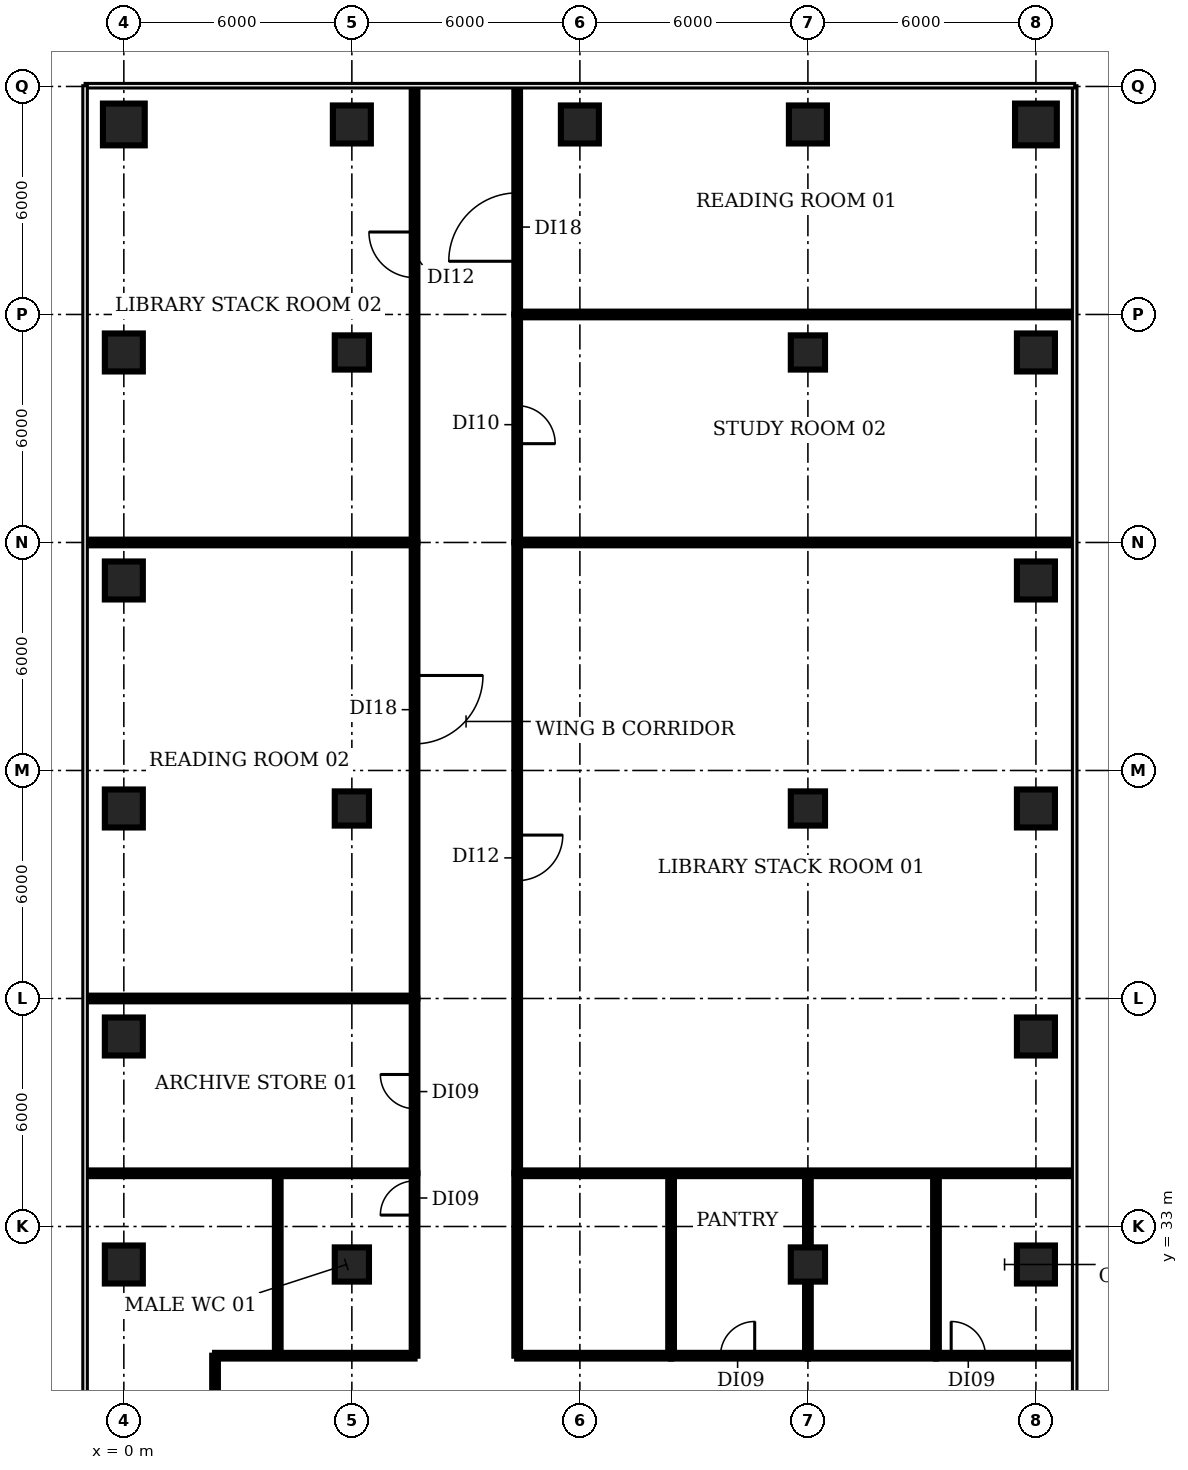
"""IFC4 building model, lengths in metres.
Left out: names, types, materials, properties, quantities, classifications, styles, units other than length and angle.
Written with IfcOpenShell. Run it as: python <this file> out.ifc"""

import sys

from ifc_helpers import new_model, si_unit, direction, frame, frame_2d, origin, origin_2d, place, context, subcontext, project, spatial, rectangle, circle, extrude, element, fill, save


model = new_model("IFC4")
c1 = context("Model", 3, precision=1e-05, world=origin(), true_north=direction((0.0, 1.0)))
c2 = subcontext(c1, "Body", "Model", "MODEL_VIEW")
j1 = project(units=[si_unit("LENGTHUNIT", "METRE"), si_unit("PLANEANGLEUNIT", "RADIAN")], contexts=[c1])
p1 = place(None, origin())
s1 = spatial("IfcSite", under=j1, at=p1, CompositionType="ELEMENT")
p2 = place(p1, origin())
s2 = spatial("IfcBuilding", under=s1, at=p2, CompositionType="ELEMENT")
p3 = place(p2, frame((0.0, 0.0, 15.5)))
s3 = spatial("IfcBuildingStorey", under=s2, at=p3, CompositionType="ELEMENT", Elevation=15.5)
for number, where, z_axis, x_axis in (
    (1, (0.0, 32.0, 0.0), (0.0, 0.0, 1.0), (1.0, 0.0, 0.0)),
    (2, (0.0, 38.0, 0.0), (0.0, 0.0, 1.0), (1.0, 0.0, 0.0)),
    (3, (0.0, 44.0, 0.0), (0.0, 0.0, 1.0), (1.0, 0.0, 0.0)),
    (4, (0.0, 50.0, 0.0), (0.0, 0.0, 1.0), (1.0, 0.0, 0.0)),
    (5, (0.0, 56.0, 0.0), (0.0, 0.0, 1.0), (1.0, 0.0, 0.0)),
):
    element("IfcColumn", number, at=place(p3, frame(where, z_axis=z_axis, x_axis=x_axis)), inside=s3, PredefinedType="COLUMN", context=c2, shape_type="SweptSolid", body=[
        extrude(rectangle(XDim=1.0, YDim=1.0, at=origin_2d()), origin(), (0.0, 0.0, 1.0), 4.15),
    ])
p4 = place(p3, frame((0.0, 62.0, 0.0), z_axis=(0.0, 0.0, 1.0), x_axis=(1.0, 0.0, 0.0)))
e6 = element("IfcColumn", 6, at=p4, inside=s3, PredefinedType="COLUMN", context=c2, shape_type="SweptSolid", body=[
    extrude(circle(Radius=0.55, at=origin_2d()), origin(), (0.0, 0.0, 1.0), 4.15),
])
for number, where, z_axis, x_axis in (
    (7, (6.0, 32.0, 0.0), (0.0, 0.0, 1.0), (1.0, 0.0, 0.0)),
    (8, (6.0, 44.0, 0.0), (0.0, 0.0, 1.0), (1.0, 0.0, 0.0)),
    (9, (6.0, 56.0, 0.0), (0.0, 0.0, 1.0), (1.0, 0.0, 0.0)),
):
    element("IfcColumn", number, at=place(p3, frame(where, z_axis=z_axis, x_axis=x_axis)), inside=s3, PredefinedType="COLUMN", context=c2, shape_type="SweptSolid", body=[
        extrude(rectangle(XDim=0.9, YDim=0.9, at=origin_2d()), origin(), (0.0, 0.0, 1.0), 4.15),
    ])
for number, where, z_axis, x_axis in (
    (10, (6.0, 62.0, 0.0), (0.0, 0.0, 1.0), (1.0, 0.0, 0.0)),
    (11, (12.0, 62.0, 0.0), (0.0, 0.0, 1.0), (1.0, 0.0, 0.0)),
):
    element("IfcColumn", number, at=place(p3, frame(where, z_axis=z_axis, x_axis=x_axis)), inside=s3, PredefinedType="COLUMN", context=c2, shape_type="SweptSolid", body=[
        extrude(rectangle(XDim=1.0, YDim=1.0, at=origin_2d()), origin(), (0.0, 0.0, 1.0), 4.15),
    ])
for number, where, z_axis, x_axis in (
    (12, (18.0, 32.0, 0.0), (0.0, 0.0, 1.0), (1.0, 0.0, 0.0)),
    (13, (18.0, 44.0, 0.0), (0.0, 0.0, 1.0), (1.0, 0.0, 0.0)),
    (14, (18.0, 56.0, 0.0), (0.0, 0.0, 1.0), (1.0, 0.0, 0.0)),
):
    element("IfcColumn", number, at=place(p3, frame(where, z_axis=z_axis, x_axis=x_axis)), inside=s3, PredefinedType="COLUMN", context=c2, shape_type="SweptSolid", body=[
        extrude(rectangle(XDim=0.9, YDim=0.9, at=origin_2d()), origin(), (0.0, 0.0, 1.0), 4.15),
    ])
for number, where, z_axis, x_axis in (
    (15, (18.0, 62.0, 0.0), (0.0, 0.0, 1.0), (1.0, 0.0, 0.0)),
    (16, (24.0, 32.0, 0.0), (0.0, 0.0, 1.0), (1.0, 0.0, 0.0)),
    (17, (24.0, 38.0, 0.0), (0.0, 0.0, 1.0), (1.0, 0.0, 0.0)),
    (18, (24.0, 44.0, 0.0), (0.0, 0.0, 1.0), (1.0, 0.0, 0.0)),
    (19, (24.0, 50.0, 0.0), (0.0, 0.0, 1.0), (1.0, 0.0, 0.0)),
    (20, (24.0, 56.0, 0.0), (0.0, 0.0, 1.0), (1.0, 0.0, 0.0)),
):
    element("IfcColumn", number, at=place(p3, frame(where, z_axis=z_axis, x_axis=x_axis)), inside=s3, PredefinedType="COLUMN", context=c2, shape_type="SweptSolid", body=[
        extrude(rectangle(XDim=1.0, YDim=1.0, at=origin_2d()), origin(), (0.0, 0.0, 1.0), 4.15),
    ])
p5 = place(p3, frame((24.0, 62.0, 0.0), z_axis=(0.0, 0.0, 1.0), x_axis=(1.0, 0.0, 0.0)))
e21 = element("IfcColumn", 21, at=p5, inside=s3, PredefinedType="COLUMN", context=c2, shape_type="SweptSolid", body=[
    extrude(circle(Radius=0.55, at=origin_2d()), origin(), (0.0, 0.0, 1.0), 4.15),
])
for number, where, z_axis, x_axis in (
    (22, (-0.97, 34.4, 0.0), (0.0, 0.0, 1.0), (1.0, 0.0, 0.0)),
    (23, (-0.97, 39.0, 0.0), (0.0, 0.0, 1.0), (1.0, 0.0, 0.0)),
    (24, (-0.97, 51.0, 0.0), (0.0, 0.0, 1.0), (1.0, 0.0, 0.0)),
):
    element("IfcWall", number, at=place(p3, frame(where, z_axis=z_axis, x_axis=x_axis)), inside=s3, PredefinedType="PARTITIONING", context=c2, shape_type="SweptSolid", body=[
        extrude(rectangle(XDim=8.62, YDim=0.15, at=frame_2d((4.31, 0.0))), origin(), (0.0, 0.0, 1.0), 3.08),
    ])
p6 = place(p3, frame((2.4, 25.7, 0.0), z_axis=(0.0, 0.0, 1.0), x_axis=(0.0, 1.0, 0.0)))
e25 = element("IfcWall", 25, at=p6, inside=s3, PredefinedType="PARTITIONING", context=c2, shape_type="SweptSolid", body=[
    extrude(rectangle(XDim=3.9, YDim=0.15, at=frame_2d((1.95, 0.0))), origin(), (0.0, 0.0, 1.0), 3.08),
])
p7 = place(p3, frame((2.4, 29.6, 0.0), z_axis=(0.0, 0.0, 1.0), x_axis=(1.0, 0.0, 0.0)))
e26 = element("IfcWall", 26, at=p7, inside=s3, PredefinedType="PARTITIONING", context=c2, shape_type="SweptSolid", body=[
    extrude(rectangle(XDim=5.25, YDim=0.15, at=frame_2d((2.625, 0.0))), origin(), (0.0, 0.0, 1.0), 3.08),
])
p8 = place(p3, frame((4.05, 29.6, 0.0), z_axis=(0.0, 0.0, 1.0), x_axis=(0.0, 1.0, 0.0)))
e27 = element("IfcWall", 27, at=p8, inside=s3, PredefinedType="PARTITIONING", context=c2, shape_type="SweptSolid", body=[
    extrude(rectangle(XDim=4.8, YDim=0.15, at=frame_2d((2.4, 0.0))), origin(), (0.0, 0.0, 1.0), 3.08),
])
p9 = place(p3, frame((7.65, 29.6, 0.0), z_axis=(0.0, 0.0, 1.0), x_axis=(0.0, 1.0, 0.0)))
e28 = element("IfcWall", 28, at=p9, inside=s3, PredefinedType="PARTITIONING", context=c2, shape_type="SweptSolid", body=[
    extrude(rectangle(XDim=4.8, YDim=0.15, at=frame_2d((2.4, 0.0))), origin(), (0.0, 0.0, 1.0), 3.08),
])
p10 = place(p9, frame((3.7, 0.0, 0.0)))
e29 = element("IfcOpeningElement", 29, at=p10, cuts=e28, PredefinedType="OPENING", context=c2, shape_type="SweptSolid", body=[
    extrude(rectangle(XDim=0.9, YDim=2.1, at=frame_2d((0.45, 1.05))), frame((0.0, 0.085, 0.0), z_axis=(0.0, -1.0, 0.0), x_axis=(1.0, 0.0, 0.0)), (0.0, 0.0, 1.0), 0.17),
])
p11 = place(p3, frame((7.65, 34.4, 0.0), z_axis=(0.0, 0.0, 1.0), x_axis=(0.0, 1.0, 0.0)))
e30 = element("IfcWall", 30, at=p11, inside=s3, PredefinedType="PARTITIONING", context=c2, shape_type="SweptSolid", body=[
    extrude(rectangle(XDim=4.6, YDim=0.15, at=frame_2d((2.3, 0.0))), origin(), (0.0, 0.0, 1.0), 3.08),
])
p12 = place(p11, frame((1.7, 0.0, 0.0)))
e31 = element("IfcOpeningElement", 31, at=p12, cuts=e30, PredefinedType="OPENING", context=c2, shape_type="SweptSolid", body=[
    extrude(rectangle(XDim=0.9, YDim=2.1, at=frame_2d((0.45, 1.05))), frame((0.0, 0.085, 0.0), z_axis=(0.0, -1.0, 0.0), x_axis=(1.0, 0.0, 0.0)), (0.0, 0.0, 1.0), 0.17),
])
p13 = place(p3, frame((7.65, 51.0, 0.0), z_axis=(0.0, 0.0, 1.0), x_axis=(0.0, -1.0, 0.0)))
e32 = element("IfcWall", 32, at=p13, inside=s3, PredefinedType="PARTITIONING", context=c2, shape_type="SweptSolid", body=[
    extrude(rectangle(XDim=12.0, YDim=0.15, at=frame_2d((6.0, 0.0))), origin(), (0.0, 0.0, 1.0), 3.08),
])
p14 = place(p13, frame((3.5, 0.0, 0.0)))
e33 = element("IfcOpeningElement", 33, at=p14, cuts=e32, PredefinedType="OPENING", context=c2, shape_type="SweptSolid", body=[
    extrude(rectangle(XDim=1.8, YDim=2.1, at=frame_2d((0.9, 1.05))), frame((0.0, 0.085, 0.0), z_axis=(0.0, -1.0, 0.0), x_axis=(1.0, 0.0, 0.0)), (0.0, 0.0, 1.0), 0.17),
])
p15 = place(p3, frame((7.65, 51.0, 0.0), z_axis=(0.0, 0.0, 1.0), x_axis=(0.0, 1.0, 0.0)))
e34 = element("IfcWall", 34, at=p15, inside=s3, PredefinedType="PARTITIONING", context=c2, shape_type="SweptSolid", body=[
    extrude(rectangle(XDim=11.97, YDim=0.15, at=frame_2d((5.985, 0.0))), origin(), (0.0, 0.0, 1.0), 3.08),
])
p16 = place(p15, frame((6.97, 0.0, 0.0)))
e35 = element("IfcOpeningElement", 35, at=p16, cuts=e34, PredefinedType="OPENING", context=c2, shape_type="SweptSolid", body=[
    extrude(rectangle(XDim=1.2, YDim=2.1, at=frame_2d((0.6, 1.05))), frame((0.0, 0.085, 0.0), z_axis=(0.0, -1.0, 0.0), x_axis=(1.0, 0.0, 0.0)), (0.0, 0.0, 1.0), 0.17),
])
p17 = place(p3, frame((10.35, 29.6, 0.0), z_axis=(0.0, 0.0, 1.0), x_axis=(0.0, 1.0, 0.0)))
e36 = element("IfcWall", 36, at=p17, inside=s3, PredefinedType="PARTITIONING", context=c2, shape_type="SweptSolid", body=[
    extrude(rectangle(XDim=4.8, YDim=0.15, at=frame_2d((2.4, 0.0))), origin(), (0.0, 0.0, 1.0), 3.08),
])
p18 = place(p3, frame((10.35, 29.6, 0.0), z_axis=(0.0, 0.0, 1.0), x_axis=(1.0, 0.0, 0.0)))
e37 = element("IfcWall", 37, at=p18, inside=s3, PredefinedType="PARTITIONING", context=c2, shape_type="SweptSolid", body=[
    extrude(rectangle(XDim=4.05, YDim=0.15, at=frame_2d((2.025, 0.0))), origin(), (0.0, 0.0, 1.0), 3.08),
])
p19 = place(p3, frame((10.35, 34.4, 0.0), z_axis=(0.0, 0.0, 1.0), x_axis=(1.0, 0.0, 0.0)))
e38 = element("IfcWall", 38, at=p19, inside=s3, PredefinedType="PARTITIONING", context=c2, shape_type="SweptSolid", body=[
    extrude(rectangle(XDim=14.62, YDim=0.15, at=frame_2d((7.31, 0.0))), origin(), (0.0, 0.0, 1.0), 3.08),
])
p20 = place(p3, frame((10.35, 51.0, 0.0), z_axis=(0.0, 0.0, 1.0), x_axis=(0.0, -1.0, 0.0)))
e39 = element("IfcWall", 39, at=p20, inside=s3, PredefinedType="PARTITIONING", context=c2, shape_type="SweptSolid", body=[
    extrude(rectangle(XDim=16.6, YDim=0.15, at=frame_2d((8.3, 0.0))), origin(), (0.0, 0.0, 1.0), 3.08),
])
p21 = place(p20, frame((7.7, 0.0, 0.0)))
e40 = element("IfcOpeningElement", 40, at=p21, cuts=e39, PredefinedType="OPENING", context=c2, shape_type="SweptSolid", body=[
    extrude(rectangle(XDim=1.2, YDim=2.1, at=frame_2d((0.6, 1.05))), frame((0.0, 0.085, 0.0), z_axis=(0.0, -1.0, 0.0), x_axis=(1.0, 0.0, 0.0)), (0.0, 0.0, 1.0), 0.17),
])
p22 = place(p3, frame((10.35, 51.0, 0.0), z_axis=(0.0, 0.0, 1.0), x_axis=(1.0, 0.0, 0.0)))
e41 = element("IfcWall", 41, at=p22, inside=s3, PredefinedType="PARTITIONING", context=c2, shape_type="SweptSolid", body=[
    extrude(rectangle(XDim=14.62, YDim=0.15, at=frame_2d((7.31, 0.0))), origin(), (0.0, 0.0, 1.0), 3.08),
])
p23 = place(p3, frame((10.35, 57.0, 0.0), z_axis=(0.0, 0.0, 1.0), x_axis=(0.0, -1.0, 0.0)))
e42 = element("IfcWall", 42, at=p23, inside=s3, PredefinedType="PARTITIONING", context=c2, shape_type="SweptSolid", body=[
    extrude(rectangle(XDim=6.0, YDim=0.15, at=frame_2d((3.0, 0.0))), origin(), (0.0, 0.0, 1.0), 3.08),
])
p24 = place(p23, frame((2.4, 0.0, 0.0)))
e43 = element("IfcOpeningElement", 43, at=p24, cuts=e42, PredefinedType="OPENING", context=c2, shape_type="SweptSolid", body=[
    extrude(rectangle(XDim=1.0, YDim=2.1, at=frame_2d((0.5, 1.05))), frame((0.0, 0.085, 0.0), z_axis=(0.0, -1.0, 0.0), x_axis=(1.0, 0.0, 0.0)), (0.0, 0.0, 1.0), 0.17),
])
p25 = place(p3, frame((10.35, 57.0, 0.0), z_axis=(0.0, 0.0, 1.0), x_axis=(0.0, 1.0, 0.0)))
e44 = element("IfcWall", 44, at=p25, inside=s3, PredefinedType="PARTITIONING", context=c2, shape_type="SweptSolid", body=[
    extrude(rectangle(XDim=5.97, YDim=0.15, at=frame_2d((2.985, 0.0))), origin(), (0.0, 0.0, 1.0), 3.08),
])
p26 = place(p25, frame((1.4, 0.0, 0.0)))
e45 = element("IfcOpeningElement", 45, at=p26, cuts=e44, PredefinedType="OPENING", context=c2, shape_type="SweptSolid", body=[
    extrude(rectangle(XDim=1.8, YDim=2.1, at=frame_2d((0.9, 1.05))), frame((0.0, 0.085, 0.0), z_axis=(0.0, -1.0, 0.0), x_axis=(1.0, 0.0, 0.0)), (0.0, 0.0, 1.0), 0.17),
])
p27 = place(p3, frame((10.35, 57.0, 0.0), z_axis=(0.0, 0.0, 1.0), x_axis=(1.0, 0.0, 0.0)))
e46 = element("IfcWall", 46, at=p27, inside=s3, PredefinedType="PARTITIONING", context=c2, shape_type="SweptSolid", body=[
    extrude(rectangle(XDim=14.605, YDim=0.15, at=frame_2d((7.302, 0.0))), origin(), (0.0, 0.0, 1.0), 3.08),
])
p28 = place(p3, frame((14.4, 29.6, 0.0), z_axis=(0.0, 0.0, 1.0), x_axis=(0.0, 1.0, 0.0)))
e47 = element("IfcWall", 47, at=p28, inside=s3, PredefinedType="PARTITIONING", context=c2, shape_type="SweptSolid", body=[
    extrude(rectangle(XDim=4.8, YDim=0.15, at=frame_2d((2.4, 0.0))), origin(), (0.0, 0.0, 1.0), 3.08),
])
p29 = place(p3, frame((14.4, 29.6, 0.0), z_axis=(0.0, 0.0, 1.0), x_axis=(1.0, 0.0, 0.0)))
e48 = element("IfcWall", 48, at=p29, inside=s3, PredefinedType="PARTITIONING", context=c2, shape_type="SweptSolid", body=[
    extrude(rectangle(XDim=3.6, YDim=0.15, at=frame_2d((1.8, 0.0))), origin(), (0.0, 0.0, 1.0), 3.08),
])
p30 = place(p29, frame((1.3, 0.0, 0.0)))
e49 = element("IfcOpeningElement", 49, at=p30, cuts=e48, PredefinedType="OPENING", context=c2, shape_type="SweptSolid", body=[
    extrude(rectangle(XDim=0.9, YDim=2.1, at=frame_2d((0.45, 1.05))), frame((0.0, 0.085, 0.0), z_axis=(0.0, -1.0, 0.0), x_axis=(1.0, 0.0, 0.0)), (0.0, 0.0, 1.0), 0.17),
])
p31 = place(p3, frame((18.0, 29.6, 0.0), z_axis=(0.0, 0.0, 1.0), x_axis=(0.0, 1.0, 0.0)))
e50 = element("IfcWall", 50, at=p31, inside=s3, PredefinedType="PARTITIONING", context=c2, shape_type="SweptSolid", body=[
    extrude(rectangle(XDim=4.8, YDim=0.15, at=frame_2d((2.4, 0.0))), origin(), (0.0, 0.0, 1.0), 3.08),
])
p32 = place(p3, frame((18.0, 29.6, 0.0), z_axis=(0.0, 0.0, 1.0), x_axis=(1.0, 0.0, 0.0)))
e51 = element("IfcWall", 51, at=p32, inside=s3, PredefinedType="PARTITIONING", context=c2, shape_type="SweptSolid", body=[
    extrude(rectangle(XDim=3.37, YDim=0.15, at=frame_2d((1.685, 0.0))), origin(), (0.0, 0.0, 1.0), 3.08),
])
p33 = place(p3, frame((21.37, 29.6, 0.0), z_axis=(0.0, 0.0, 1.0), x_axis=(0.0, 1.0, 0.0)))
e52 = element("IfcWall", 52, at=p33, inside=s3, PredefinedType="PARTITIONING", context=c2, shape_type="SweptSolid", body=[
    extrude(rectangle(XDim=4.8, YDim=0.15, at=frame_2d((2.4, 0.0))), origin(), (0.0, 0.0, 1.0), 3.08),
])
p34 = place(p3, frame((21.37, 29.6, 0.0), z_axis=(0.0, 0.0, 1.0), x_axis=(1.0, 0.0, 0.0)))
e53 = element("IfcWall", 53, at=p34, inside=s3, PredefinedType="PARTITIONING", context=c2, shape_type="SweptSolid", body=[
    extrude(rectangle(XDim=3.6, YDim=0.15, at=frame_2d((1.8, 0.0))), origin(), (0.0, 0.0, 1.0), 3.08),
])
p35 = place(p34, frame((0.4, 0.0, 0.0)))
e54 = element("IfcOpeningElement", 54, at=p35, cuts=e53, PredefinedType="OPENING", context=c2, shape_type="SweptSolid", body=[
    extrude(rectangle(XDim=0.9, YDim=2.1, at=frame_2d((0.45, 1.05))), frame((0.0, 0.085, 0.0), z_axis=(0.0, -1.0, 0.0), x_axis=(1.0, 0.0, 0.0)), (0.0, 0.0, 1.0), 0.17),
])
p36 = place(p10, origin())
e55 = element("IfcDoor", 55, at=p36, inside=s3, OperationType="SINGLE_SWING_LEFT", PredefinedType="DOOR", context=c2, shape_type="SweptSolid", body=[
    extrude(rectangle(XDim=0.9, YDim=2.1, at=frame_2d((0.45, 1.05))), frame((0.0, 0.025, 0.0), z_axis=(0.0, -1.0, 0.0), x_axis=(1.0, 0.0, 0.0)), (0.0, 0.0, 1.0), 0.05),
])
fill(e29, e55)
p37 = place(p12, origin())
e56 = element("IfcDoor", 56, at=p37, inside=s3, OperationType="SINGLE_SWING_RIGHT", PredefinedType="DOOR", context=c2, shape_type="SweptSolid", body=[
    extrude(rectangle(XDim=0.9, YDim=2.1, at=frame_2d((0.45, 1.05))), frame((0.0, 0.025, 0.0), z_axis=(0.0, -1.0, 0.0), x_axis=(1.0, 0.0, 0.0)), (0.0, 0.0, 1.0), 0.05),
])
fill(e31, e56)
p38 = place(p14, origin())
e57 = element("IfcDoor", 57, at=p38, inside=s3, OperationType="SINGLE_SWING_LEFT", PredefinedType="DOOR", context=c2, shape_type="SweptSolid", body=[
    extrude(rectangle(XDim=1.8, YDim=2.1, at=frame_2d((0.9, 1.05))), frame((0.0, 0.025, 0.0), z_axis=(0.0, -1.0, 0.0), x_axis=(1.0, 0.0, 0.0)), (0.0, 0.0, 1.0), 0.05),
])
fill(e33, e57)
p39 = place(p16, origin())
e58 = element("IfcDoor", 58, at=p39, inside=s3, OperationType="SINGLE_SWING_RIGHT", PredefinedType="DOOR", context=c2, shape_type="SweptSolid", body=[
    extrude(rectangle(XDim=1.2, YDim=2.1, at=frame_2d((0.6, 1.05))), frame((0.0, 0.025, 0.0), z_axis=(0.0, -1.0, 0.0), x_axis=(1.0, 0.0, 0.0)), (0.0, 0.0, 1.0), 0.05),
])
fill(e35, e58)
p40 = place(p21, origin())
e59 = element("IfcDoor", 59, at=p40, inside=s3, OperationType="SINGLE_SWING_LEFT", PredefinedType="DOOR", context=c2, shape_type="SweptSolid", body=[
    extrude(rectangle(XDim=1.2, YDim=2.1, at=frame_2d((0.6, 1.05))), frame((0.0, 0.025, 0.0), z_axis=(0.0, -1.0, 0.0), x_axis=(1.0, 0.0, 0.0)), (0.0, 0.0, 1.0), 0.05),
])
fill(e40, e59)
p41 = place(p24, origin())
e60 = element("IfcDoor", 60, at=p41, inside=s3, OperationType="SINGLE_SWING_RIGHT", PredefinedType="DOOR", context=c2, shape_type="SweptSolid", body=[
    extrude(rectangle(XDim=1.0, YDim=2.1, at=frame_2d((0.5, 1.05))), frame((0.0, 0.025, 0.0), z_axis=(0.0, -1.0, 0.0), x_axis=(1.0, 0.0, 0.0)), (0.0, 0.0, 1.0), 0.05),
])
fill(e43, e60)
p42 = place(p26, origin())
e61 = element("IfcDoor", 61, at=p42, inside=s3, OperationType="SINGLE_SWING_LEFT", PredefinedType="DOOR", context=c2, shape_type="SweptSolid", body=[
    extrude(rectangle(XDim=1.8, YDim=2.1, at=frame_2d((0.9, 1.05))), frame((0.0, 0.025, 0.0), z_axis=(0.0, -1.0, 0.0), x_axis=(1.0, 0.0, 0.0)), (0.0, 0.0, 1.0), 0.05),
])
fill(e45, e61)
p43 = place(p30, origin())
e62 = element("IfcDoor", 62, at=p43, inside=s3, OperationType="SINGLE_SWING_RIGHT", PredefinedType="DOOR", context=c2, shape_type="SweptSolid", body=[
    extrude(rectangle(XDim=0.9, YDim=2.1, at=frame_2d((0.45, 1.05))), frame((0.0, 0.025, 0.0), z_axis=(0.0, -1.0, 0.0), x_axis=(1.0, 0.0, 0.0)), (0.0, 0.0, 1.0), 0.05),
])
fill(e49, e62)
p44 = place(p35, origin())
e63 = element("IfcDoor", 63, at=p44, inside=s3, OperationType="SINGLE_SWING_LEFT", PredefinedType="DOOR", context=c2, shape_type="SweptSolid", body=[
    extrude(rectangle(XDim=0.9, YDim=2.1, at=frame_2d((0.45, 1.05))), frame((0.0, 0.025, 0.0), z_axis=(0.0, -1.0, 0.0), x_axis=(1.0, 0.0, 0.0)), (0.0, 0.0, 1.0), 0.05),
])
fill(e54, e63)
save(model, sys.argv[1])
